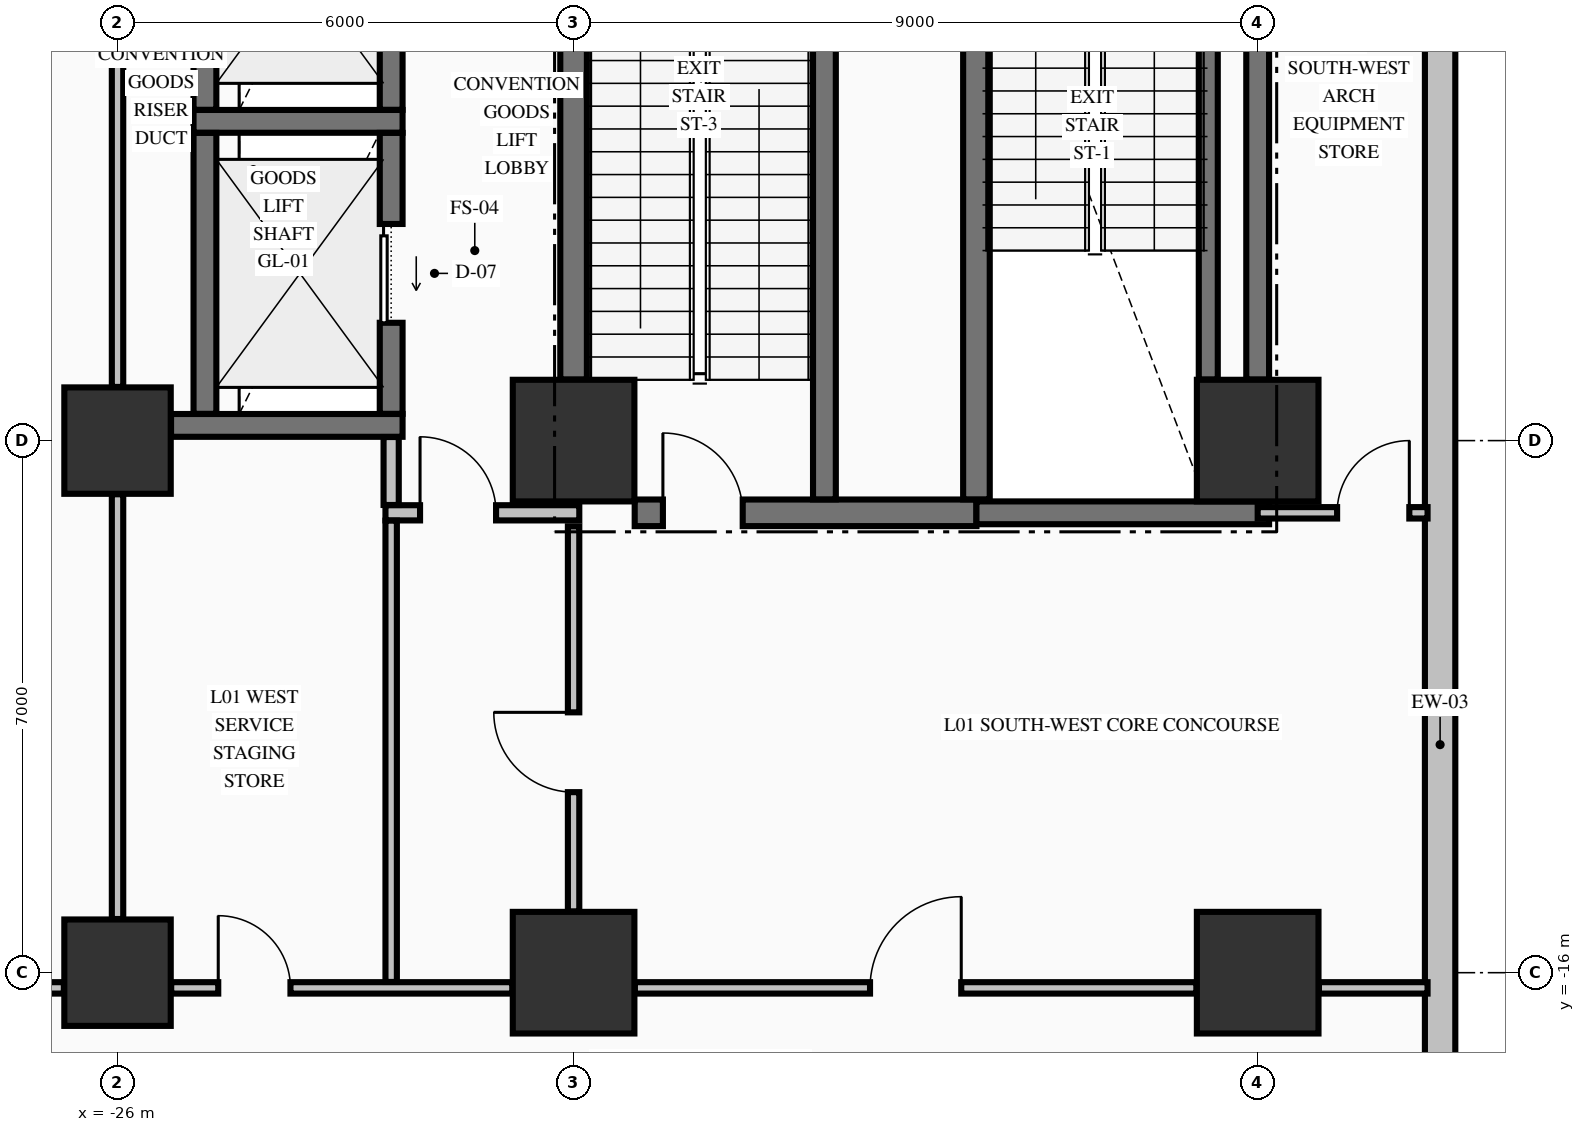
"""IFC4 building model, lengths in metres.
Left out: names, types, materials, properties, quantities, classifications, styles, units other than length and angle.
Written with IfcOpenShell. Run it as: python <this file> out.ifc"""

import sys

from ifc_helpers import new_model, si_unit, direction, frame, frame_2d, origin, origin_2d, place, context, subcontext, project, spatial, rectangle, extrude, element, fill, save


model = new_model("IFC4")
c1 = context("Model", 3, precision=1e-05, world=origin(), true_north=direction((0.0, 1.0)))
c2 = subcontext(c1, "Body", "Model", "MODEL_VIEW")
j1 = project(units=[si_unit("LENGTHUNIT", "METRE"), si_unit("PLANEANGLEUNIT", "RADIAN")], contexts=[c1])
p1 = place(None, origin())
s1 = spatial("IfcSite", under=j1, at=p1, CompositionType="ELEMENT")
p2 = place(p1, origin())
s2 = spatial("IfcBuilding", under=s1, at=p2, CompositionType="ELEMENT")
p3 = place(p2, frame((0.0, 0.0, 5.44)))
s3 = spatial("IfcBuildingStorey", under=s2, at=p3, CompositionType="ELEMENT", Elevation=5.44)
for number, where, z_axis, x_axis in (
    (1, (-26.0, -16.0, 0.0), (0.0, 0.0, 1.0), (1.0, 0.0, 0.0)),
    (2, (-26.0, -9.0, 0.0), (0.0, 0.0, 1.0), (1.0, 0.0, 0.0)),
):
    element("IfcColumn", number, at=place(p3, frame(where, z_axis=z_axis, x_axis=x_axis)), inside=s3, PredefinedType="COLUMN", context=c2, shape_type="SweptSolid", body=[
        extrude(rectangle(XDim=1.4, YDim=1.4, at=origin_2d()), origin(), (0.0, 0.0, 1.0), 5.09),
    ])
for number, where, z_axis, x_axis in (
    (3, (-20.0, -16.0, 0.0), (0.0, 0.0, 1.0), (1.0, 0.0, 0.0)),
    (4, (-20.0, -9.0, 0.0), (0.0, 0.0, 1.0), (1.0, 0.0, 0.0)),
    (5, (-11.0, -16.0, 0.0), (0.0, 0.0, 1.0), (1.0, 0.0, 0.0)),
    (6, (-11.0, -9.0, 0.0), (0.0, 0.0, 1.0), (1.0, 0.0, 0.0)),
):
    element("IfcColumn", number, at=place(p3, frame(where, z_axis=z_axis, x_axis=x_axis)), inside=s3, PredefinedType="COLUMN", context=c2, shape_type="SweptSolid", body=[
        extrude(rectangle(XDim=1.6, YDim=1.6, at=origin_2d()), origin(), (0.0, 0.0, 1.0), 5.09),
    ])
p4 = place(p3, frame((-8.6, -25.37, 0.0), z_axis=(0.0, 0.0, 1.0), x_axis=(0.0, 1.0, 0.0)))
e7 = element("IfcWall", 7, at=p4, inside=s3, PredefinedType="STANDARD", context=c2, shape_type="SweptSolid", body=[
    extrude(rectangle(XDim=24.72, YDim=0.4, at=frame_2d((12.36, 0.0))), origin(), (0.0, 0.0, 1.0), 4.132),
])
p5 = place(p3, frame((-19.196, -9.95, 0.0), z_axis=(0.0, 0.0, 1.0), x_axis=(1.0, 0.0, 0.0)))
e8 = element("IfcWall", 8, at=p5, inside=s3, PredefinedType="SHEAR", context=c2, shape_type="SweptSolid", body=[
    extrude(rectangle(XDim=4.496, YDim=0.35, at=frame_2d((2.248, 0.0))), origin(), (0.0, 0.0, 1.0), 5.09),
])
p6 = place(p5, frame((0.371, 0.0, 0.0)))
e9 = element("IfcOpeningElement", 9, at=p6, cuts=e8, PredefinedType="OPENING", context=c2, shape_type="SweptSolid", body=[
    extrude(rectangle(XDim=1.05, YDim=2.15, at=frame_2d((0.525, 1.075))), frame((0.0, 0.185, 0.0), z_axis=(0.0, -1.0, 0.0), x_axis=(1.0, 0.0, 0.0)), (0.0, 0.0, 1.0), 0.37),
])
p7 = place(p3, frame((-14.7, -9.95, 0.0), z_axis=(0.0, 0.0, 1.0), x_axis=(1.0, 0.0, 0.0)))
e10 = element("IfcWall", 10, at=p7, inside=s3, PredefinedType="SHEAR", context=c2, shape_type="SweptSolid", body=[
    extrude(rectangle(XDim=3.85, YDim=0.3, at=frame_2d((1.925, 0.0))), origin(), (0.0, 0.0, 1.0), 5.09),
])
p8 = place(p3, frame((-25.296, -8.8, 0.0), z_axis=(0.0, 0.0, 1.0), x_axis=(1.0, 0.0, 0.0)))
e11 = element("IfcWall", 11, at=p8, inside=s3, PredefinedType="SHEAR", context=c2, shape_type="SweptSolid", body=[
    extrude(rectangle(XDim=3.046, YDim=0.3, at=frame_2d((1.523, 0.0))), origin(), (0.0, 0.0, 1.0), 5.09),
])
p9 = place(p3, frame((-25.0, -4.8, 0.0), z_axis=(0.0, 0.0, 1.0), x_axis=(1.0, 0.0, 0.0)))
e12 = element("IfcWall", 12, at=p9, inside=s3, PredefinedType="SHEAR", context=c2, shape_type="SweptSolid", body=[
    extrude(rectangle(XDim=2.75, YDim=0.3, at=frame_2d((1.375, 0.0))), origin(), (0.0, 0.0, 1.0), 5.09),
])
p10 = place(p3, frame((-29.294, -16.2, 0.0), z_axis=(0.0, 0.0, 1.0), x_axis=(1.0, 0.0, 0.0)))
e13 = element("IfcWall", 13, at=p10, inside=s3, PredefinedType="PARTITIONING", context=c2, shape_type="SweptSolid", body=[
    extrude(rectangle(XDim=2.588, YDim=0.15, at=frame_2d((1.294, 0.0))), origin(), (0.0, 0.0, 1.0), 4.132),
])
p11 = place(p10, frame((1.019, 0.0, 0.0)))
e14 = element("IfcOpeningElement", 14, at=p11, cuts=e13, PredefinedType="OPENING", context=c2, shape_type="SweptSolid", body=[
    extrude(rectangle(XDim=1.05, YDim=2.15, at=frame_2d((0.525, 1.075))), frame((0.0, 0.085, 0.0), z_axis=(0.0, -1.0, 0.0), x_axis=(1.0, 0.0, 0.0)), (0.0, 0.0, 1.0), 0.17),
])
p12 = place(p3, frame((-25.294, -16.2, 0.0), z_axis=(0.0, 0.0, 1.0), x_axis=(1.0, 0.0, 0.0)))
e15 = element("IfcWall", 15, at=p12, inside=s3, PredefinedType="PARTITIONING", context=c2, shape_type="SweptSolid", body=[
    extrude(rectangle(XDim=4.488, YDim=0.15, at=frame_2d((2.244, 0.0))), origin(), (0.0, 0.0, 1.0), 4.132),
])
p13 = place(p12, frame((0.619, 0.0, 0.0)))
e16 = element("IfcOpeningElement", 16, at=p13, cuts=e15, PredefinedType="OPENING", context=c2, shape_type="SweptSolid", body=[
    extrude(rectangle(XDim=0.95, YDim=2.15, at=frame_2d((0.475, 1.075))), frame((0.0, 0.085, 0.0), z_axis=(0.0, -1.0, 0.0), x_axis=(1.0, 0.0, 0.0)), (0.0, 0.0, 1.0), 0.17),
])
p14 = place(p3, frame((-19.194, -16.2, 0.0), z_axis=(0.0, 0.0, 1.0), x_axis=(1.0, 0.0, 0.0)))
e17 = element("IfcWall", 17, at=p14, inside=s3, PredefinedType="PARTITIONING", context=c2, shape_type="SweptSolid", body=[
    extrude(rectangle(XDim=7.388, YDim=0.15, at=frame_2d((3.694, 0.0))), origin(), (0.0, 0.0, 1.0), 4.132),
])
p15 = place(p14, frame((3.094, 0.0, 0.0)))
e18 = element("IfcOpeningElement", 18, at=p15, cuts=e17, PredefinedType="OPENING", context=c2, shape_type="SweptSolid", body=[
    extrude(rectangle(XDim=1.2, YDim=2.15, at=frame_2d((0.6, 1.075))), frame((0.0, 0.085, 0.0), z_axis=(0.0, -1.0, 0.0), x_axis=(1.0, 0.0, 0.0)), (0.0, 0.0, 1.0), 0.17),
])
p16 = place(p3, frame((-10.194, -16.2, 0.0), z_axis=(0.0, 0.0, 1.0), x_axis=(1.0, 0.0, 0.0)))
e19 = element("IfcWall", 19, at=p16, inside=s3, PredefinedType="PARTITIONING", context=c2, shape_type="SweptSolid", body=[
    extrude(rectangle(XDim=1.429, YDim=0.15, at=frame_2d((0.715, 0.0))), origin(), (0.0, 0.0, 1.0), 5.09),
])
p17 = place(p3, frame((-22.475, -9.95, 0.0), z_axis=(0.0, 0.0, 1.0), x_axis=(1.0, 0.0, 0.0)))
e20 = element("IfcWall", 20, at=p17, inside=s3, PredefinedType="PARTITIONING", context=c2, shape_type="SweptSolid", body=[
    extrude(rectangle(XDim=2.55, YDim=0.2, at=frame_2d((1.275, 0.0))), origin(), (0.0, 0.0, 1.0), 5.09),
])
p18 = place(p17, frame((0.455, 0.0, 0.0)))
e21 = element("IfcOpeningElement", 21, at=p18, cuts=e20, PredefinedType="OPENING", context=c2, shape_type="SweptSolid", body=[
    extrude(rectangle(XDim=1.0, YDim=2.15, at=frame_2d((0.5, 1.075))), frame((0.0, 0.11, 0.0), z_axis=(0.0, -1.0, 0.0), x_axis=(1.0, 0.0, 0.0)), (0.0, 0.0, 1.0), 0.22),
])
p19 = place(p3, frame((-11.0, -9.95, 0.0), z_axis=(0.0, 0.0, 1.0), x_axis=(1.0, 0.0, 0.0)))
e22 = element("IfcWall", 22, at=p19, inside=s3, PredefinedType="PARTITIONING", context=c2, shape_type="SweptSolid", body=[
    extrude(rectangle(XDim=2.235, YDim=0.15, at=frame_2d((1.118, 0.0))), origin(), (0.0, 0.0, 1.0), 5.09),
])
p20 = place(p19, frame((1.045, 0.0, 0.0)))
e23 = element("IfcOpeningElement", 23, at=p20, cuts=e22, PredefinedType="OPENING", context=c2, shape_type="SweptSolid", body=[
    extrude(rectangle(XDim=0.95, YDim=2.15, at=frame_2d((0.475, 1.075))), frame((0.0, 0.085, 0.0), z_axis=(0.0, -1.0, 0.0), x_axis=(1.0, 0.0, 0.0)), (0.0, 0.0, 1.0), 0.17),
])
for number, where, z_axis, x_axis in (
    (24, (-24.85, -8.648, 0.0), (0.0, 0.0, 1.0), (0.0, 1.0, 0.0)),
    (25, (-24.85, -4.648, 0.0), (0.0, 0.0, 1.0), (0.0, 1.0, 0.0)),
):
    element("IfcWall", number, at=place(p3, frame(where, z_axis=z_axis, x_axis=x_axis)), inside=s3, PredefinedType="SHEAR", context=c2, shape_type="SweptSolid", body=[
        extrude(rectangle(XDim=3.696, YDim=0.3, at=frame_2d((1.848, 0.0))), origin(), (0.0, 0.0, 1.0), 5.09),
    ])
p21 = place(p3, frame((-22.4, -8.648, 0.0), z_axis=(0.0, 0.0, 1.0), x_axis=(0.0, 1.0, 0.0)))
e26 = element("IfcWall", 26, at=p21, inside=s3, PredefinedType="SHEAR", context=c2, shape_type="SweptSolid", body=[
    extrude(rectangle(XDim=3.696, YDim=0.3, at=frame_2d((1.848, 0.0))), origin(), (0.0, 0.0, 1.0), 5.09),
])
p22 = place(p21, frame((1.198, 0.0, 0.0)))
e27 = element("IfcOpeningElement", 27, at=p22, cuts=e26, PredefinedType="OPENING", context=c2, shape_type="SweptSolid", body=[
    extrude(rectangle(XDim=1.3, YDim=2.3, at=frame_2d((0.65, 1.15))), frame((0.0, 0.16, 0.0), z_axis=(0.0, -1.0, 0.0), x_axis=(1.0, 0.0, 0.0)), (0.0, 0.0, 1.0), 0.32),
])
p23 = place(p3, frame((-22.4, -4.648, 0.0), z_axis=(0.0, 0.0, 1.0), x_axis=(0.0, 1.0, 0.0)))
e28 = element("IfcWall", 28, at=p23, inside=s3, PredefinedType="SHEAR", context=c2, shape_type="SweptSolid", body=[
    extrude(rectangle(XDim=3.696, YDim=0.3, at=frame_2d((1.848, 0.0))), origin(), (0.0, 0.0, 1.0), 5.09),
])
p24 = place(p23, frame((1.198, 0.0, 0.0)))
e29 = element("IfcOpeningElement", 29, at=p24, cuts=e28, PredefinedType="OPENING", context=c2, shape_type="SweptSolid", body=[
    extrude(rectangle(XDim=1.3, YDim=2.3, at=frame_2d((0.65, 1.15))), frame((0.0, 0.16, 0.0), z_axis=(0.0, -1.0, 0.0), x_axis=(1.0, 0.0, 0.0)), (0.0, 0.0, 1.0), 0.32),
])
p25 = place(p3, frame((-20.0, -8.196, 0.0), z_axis=(0.0, 0.0, 1.0), x_axis=(0.0, 1.0, 0.0)))
e30 = element("IfcWall", 30, at=p25, inside=s3, PredefinedType="SHEAR", context=c2, shape_type="SweptSolid", body=[
    extrude(rectangle(XDim=7.392, YDim=0.35, at=frame_2d((3.696, 0.0))), origin(), (0.0, 0.0, 1.0), 5.09),
])
p26 = place(p3, frame((-16.7, -9.773, 0.0), z_axis=(0.0, 0.0, 1.0), x_axis=(0.0, 1.0, 0.0)))
e31 = element("IfcWall", 31, at=p26, inside=s3, PredefinedType="SHEAR", context=c2, shape_type="SweptSolid", body=[
    extrude(rectangle(XDim=9.371, YDim=0.3, at=frame_2d((4.686, 0.0))), origin(), (0.0, 0.0, 1.0), 5.09),
])
p27 = place(p3, frame((-14.7, -9.773, 0.0), z_axis=(0.0, 0.0, 1.0), x_axis=(0.0, 1.0, 0.0)))
e32 = element("IfcWall", 32, at=p27, inside=s3, PredefinedType="SHEAR", context=c2, shape_type="SweptSolid", body=[
    extrude(rectangle(XDim=9.371, YDim=0.35, at=frame_2d((4.686, 0.0))), origin(), (0.0, 0.0, 1.0), 5.09),
])
p28 = place(p3, frame((-11.65, -8.196, 0.0), z_axis=(0.0, 0.0, 1.0), x_axis=(0.0, 1.0, 0.0)))
e33 = element("IfcWall", 33, at=p28, inside=s3, PredefinedType="SOLIDWALL", context=c2, shape_type="SweptSolid", body=[
    extrude(rectangle(XDim=7.392, YDim=0.25, at=frame_2d((3.696, 0.0))), origin(), (0.0, 0.0, 1.0), 5.09),
])
p29 = place(p3, frame((-11.0, -8.196, 0.0), z_axis=(0.0, 0.0, 1.0), x_axis=(0.0, 1.0, 0.0)))
e34 = element("IfcWall", 34, at=p29, inside=s3, PredefinedType="SHEAR", context=c2, shape_type="SweptSolid", body=[
    extrude(rectangle(XDim=7.392, YDim=0.3, at=frame_2d((3.696, 0.0))), origin(), (0.0, 0.0, 1.0), 5.09),
])
p30 = place(p3, frame((-26.0, -15.294, 0.0), z_axis=(0.0, 0.0, 1.0), x_axis=(0.0, 1.0, 0.0)))
e35 = element("IfcWall", 35, at=p30, inside=s3, PredefinedType="PARTITIONING", context=c2, shape_type="SweptSolid", body=[
    extrude(rectangle(XDim=5.588, YDim=0.15, at=frame_2d((2.794, 0.0))), origin(), (0.0, 0.0, 1.0), 4.132),
])
p31 = place(p3, frame((-26.0, -8.294, 0.0), z_axis=(0.0, 0.0, 1.0), x_axis=(0.0, 1.0, 0.0)))
e36 = element("IfcWall", 36, at=p31, inside=s3, PredefinedType="PARTITIONING", context=c2, shape_type="SweptSolid", body=[
    extrude(rectangle(XDim=7.341, YDim=0.15, at=frame_2d((3.67, 0.0))), origin(), (0.0, 0.0, 1.0), 4.132),
])
p32 = place(p3, frame((-22.4, -16.122, 0.0), z_axis=(0.0, 0.0, 1.0), x_axis=(0.0, 1.0, 0.0)))
e37 = element("IfcWall", 37, at=p32, inside=s3, PredefinedType="PARTITIONING", context=c2, shape_type="SweptSolid", body=[
    extrude(rectangle(XDim=6.069, YDim=0.15, at=frame_2d((3.035, 0.0))), origin(), (0.0, 0.0, 1.0), 5.09),
])
p33 = place(p3, frame((-22.4, -9.847, 0.0), z_axis=(0.0, 0.0, 1.0), x_axis=(0.0, 1.0, 0.0)))
e38 = element("IfcWall", 38, at=p33, inside=s3, PredefinedType="PARTITIONING", context=c2, shape_type="SweptSolid", body=[
    extrude(rectangle(XDim=0.894, YDim=0.2, at=frame_2d((0.447, 0.0))), origin(), (0.0, 0.0, 1.0), 5.09),
])
p34 = place(p3, frame((-20.0, -15.194, 0.0), z_axis=(0.0, 0.0, 1.0), x_axis=(0.0, 1.0, 0.0)))
e39 = element("IfcWall", 39, at=p34, inside=s3, PredefinedType="PARTITIONING", context=c2, shape_type="SweptSolid", body=[
    extrude(rectangle(XDim=5.066, YDim=0.15, at=frame_2d((2.533, 0.0))), origin(), (0.0, 0.0, 1.0), 5.09),
])
p35 = place(p34, frame((1.569, 0.0, 0.0)))
e40 = element("IfcOpeningElement", 40, at=p35, cuts=e39, PredefinedType="OPENING", context=c2, shape_type="SweptSolid", body=[
    extrude(rectangle(XDim=1.05, YDim=2.15, at=frame_2d((0.525, 1.075))), frame((0.0, 0.085, 0.0), z_axis=(0.0, -1.0, 0.0), x_axis=(1.0, 0.0, 0.0)), (0.0, 0.0, 1.0), 0.17),
])
p36 = place(p6, origin())
e41 = element("IfcDoor", 41, at=p36, inside=s3, OperationType="SINGLE_SWING_LEFT", PredefinedType="DOOR", context=c2, shape_type="SweptSolid", body=[
    extrude(rectangle(XDim=1.05, YDim=2.15, at=frame_2d((0.525, 1.075))), frame((0.0, 0.025, 0.0), z_axis=(0.0, -1.0, 0.0), x_axis=(1.0, 0.0, 0.0)), (0.0, 0.0, 1.0), 0.05),
])
fill(e9, e41)
p37 = place(p22, origin())
e42 = element("IfcDoor", 42, at=p37, inside=s3, OperationType="SLIDING_TO_LEFT", PredefinedType="DOOR", context=c2, shape_type="SweptSolid", body=[
    extrude(rectangle(XDim=1.3, YDim=2.3, at=frame_2d((0.65, 1.15))), frame((0.0, 0.025, 0.0), z_axis=(0.0, -1.0, 0.0), x_axis=(1.0, 0.0, 0.0)), (0.0, 0.0, 1.0), 0.05),
])
fill(e27, e42)
p38 = place(p20, origin())
e43 = element("IfcDoor", 43, at=p38, inside=s3, OperationType="SINGLE_SWING_RIGHT", PredefinedType="DOOR", context=c2, shape_type="SweptSolid", body=[
    extrude(rectangle(XDim=0.95, YDim=2.15, at=frame_2d((0.475, 1.075))), frame((0.0, 0.025, 0.0), z_axis=(0.0, -1.0, 0.0), x_axis=(1.0, 0.0, 0.0)), (0.0, 0.0, 1.0), 0.05),
])
fill(e23, e43)
p39 = place(p18, origin())
e44 = element("IfcDoor", 44, at=p39, inside=s3, OperationType="SINGLE_SWING_LEFT", PredefinedType="DOOR", context=c2, shape_type="SweptSolid", body=[
    extrude(rectangle(XDim=1.0, YDim=2.15, at=frame_2d((0.5, 1.075))), frame((0.0, 0.025, 0.0), z_axis=(0.0, -1.0, 0.0), x_axis=(1.0, 0.0, 0.0)), (0.0, 0.0, 1.0), 0.05),
])
fill(e21, e44)
p40 = place(p35, origin())
e45 = element("IfcDoor", 45, at=p40, inside=s3, OperationType="SINGLE_SWING_RIGHT", PredefinedType="DOOR", context=c2, shape_type="SweptSolid", body=[
    extrude(rectangle(XDim=1.05, YDim=2.15, at=frame_2d((0.525, 1.075))), frame((0.0, 0.025, 0.0), z_axis=(0.0, -1.0, 0.0), x_axis=(1.0, 0.0, 0.0)), (0.0, 0.0, 1.0), 0.05),
])
fill(e40, e45)
p41 = place(p13, origin())
e46 = element("IfcDoor", 46, at=p41, inside=s3, OperationType="SINGLE_SWING_LEFT", PredefinedType="DOOR", context=c2, shape_type="SweptSolid", body=[
    extrude(rectangle(XDim=0.95, YDim=2.15, at=frame_2d((0.475, 1.075))), frame((0.0, 0.025, 0.0), z_axis=(0.0, -1.0, 0.0), x_axis=(1.0, 0.0, 0.0)), (0.0, 0.0, 1.0), 0.05),
])
fill(e16, e46)
p42 = place(p15, origin())
e47 = element("IfcDoor", 47, at=p42, inside=s3, OperationType="SINGLE_SWING_RIGHT", PredefinedType="DOOR", context=c2, shape_type="SweptSolid", body=[
    extrude(rectangle(XDim=1.2, YDim=2.15, at=frame_2d((0.6, 1.075))), frame((0.0, 0.025, 0.0), z_axis=(0.0, -1.0, 0.0), x_axis=(1.0, 0.0, 0.0)), (0.0, 0.0, 1.0), 0.05),
])
fill(e18, e47)
save(model, sys.argv[1])
